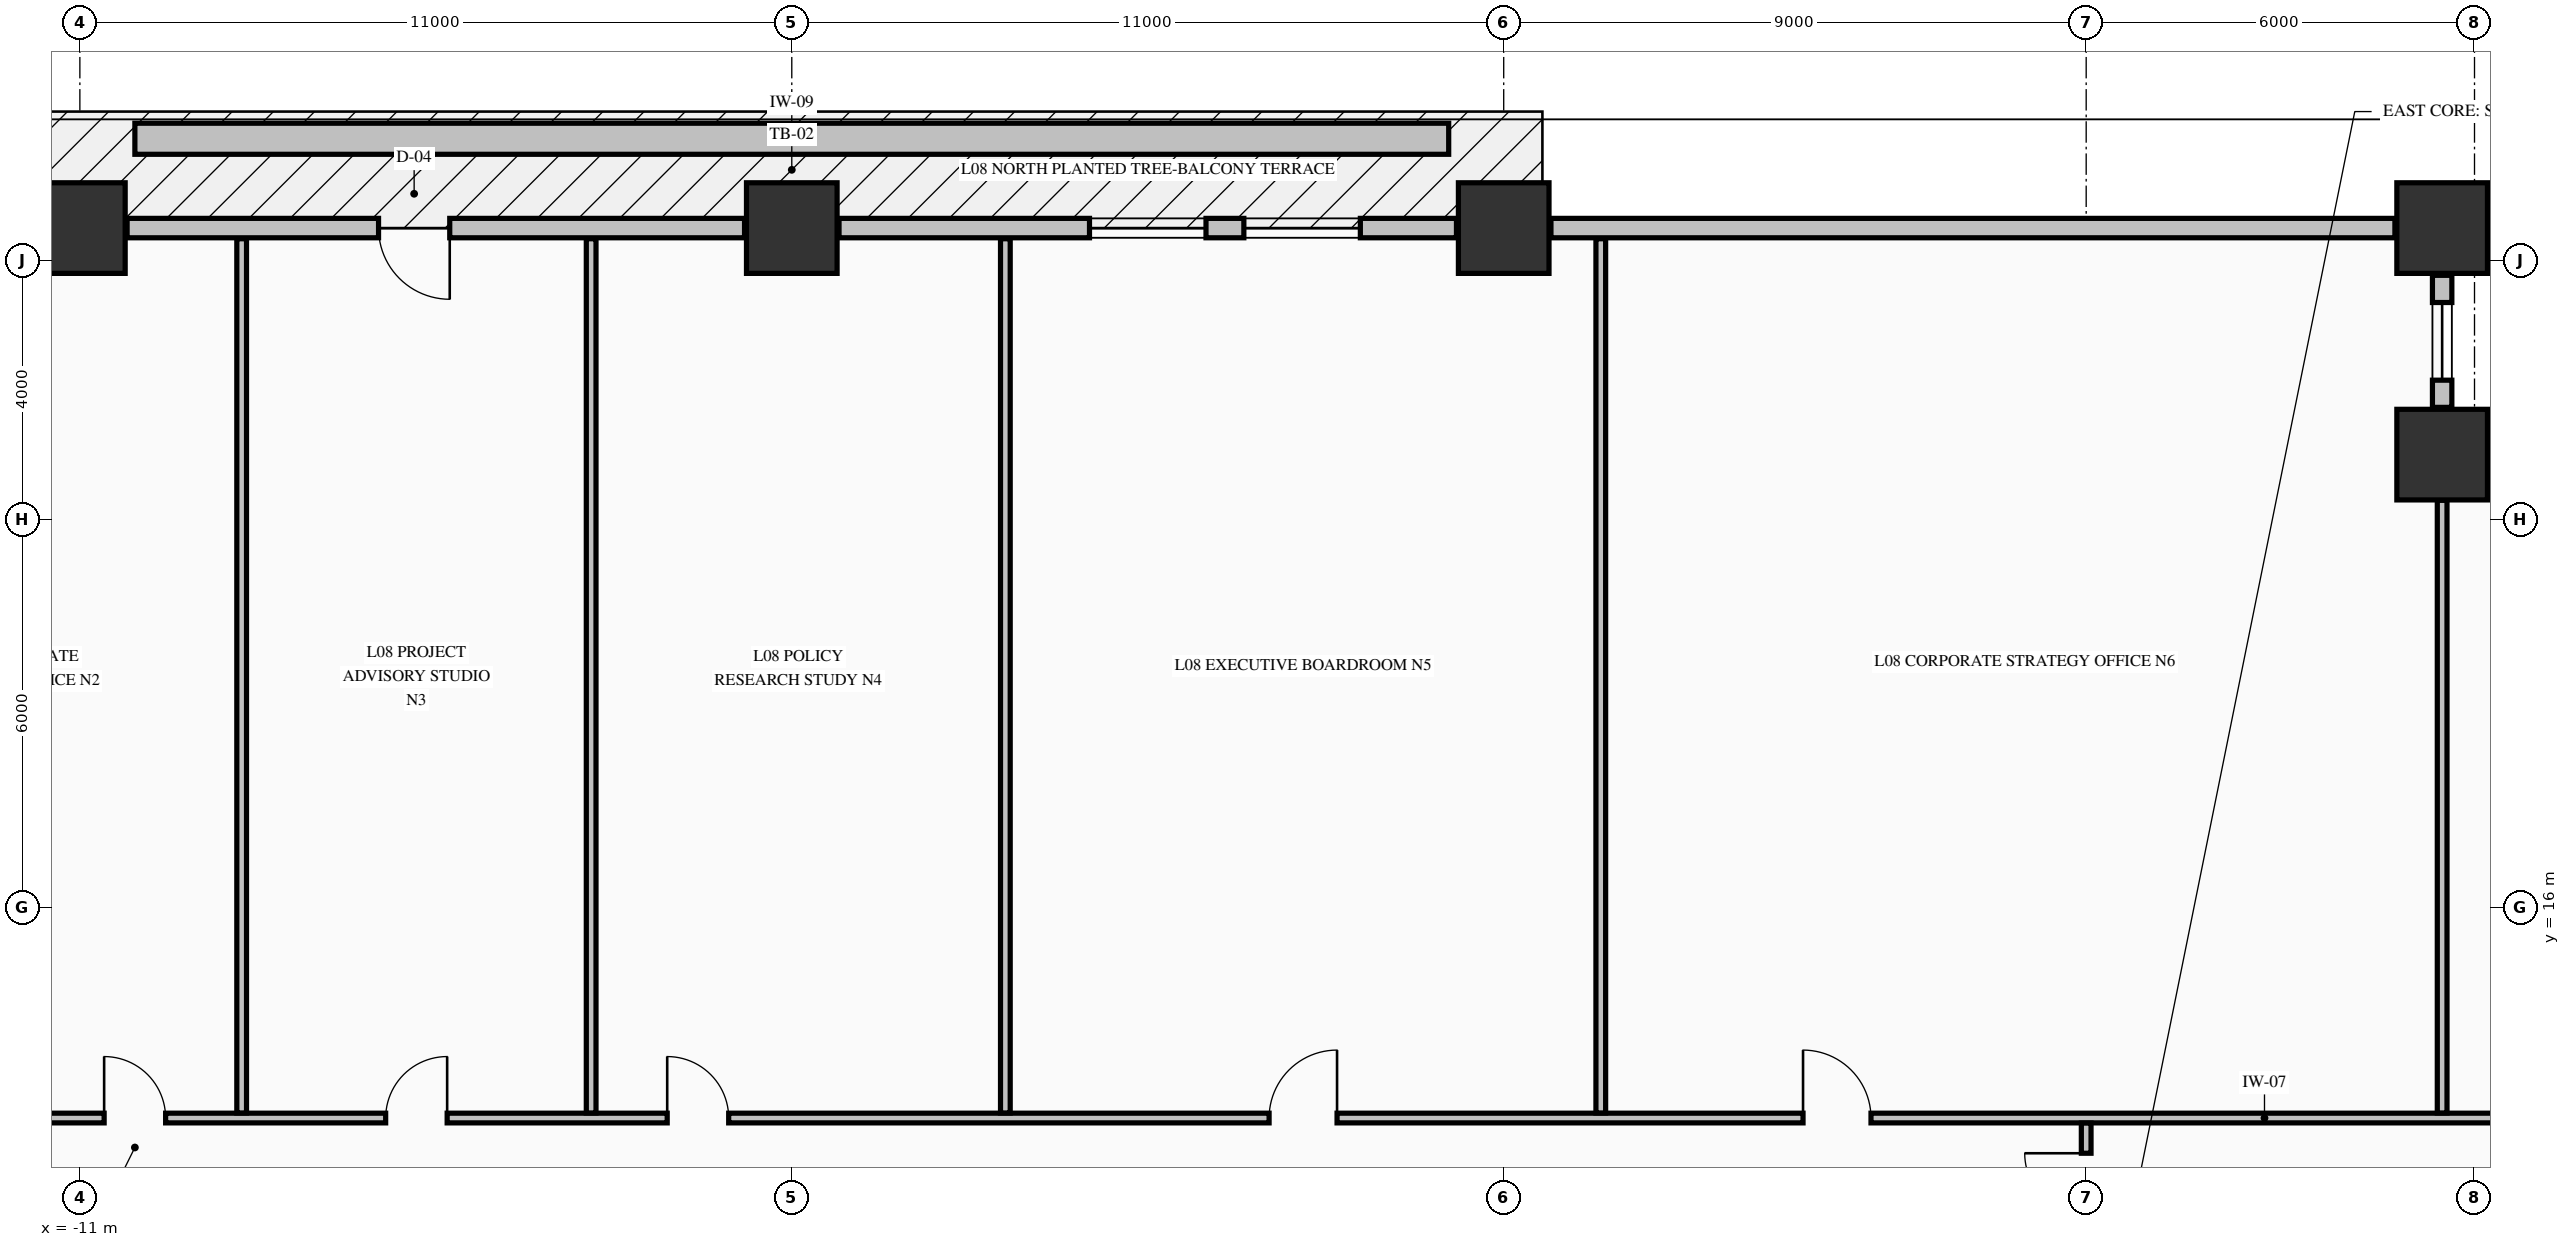
"""IFC4 building model, lengths in metres.
Left out: names, types, materials, properties, quantities, classifications, styles, units other than length and angle.
Written with IfcOpenShell. Run it as: python <this file> out.ifc"""

import sys

from ifc_helpers import new_model, si_unit, direction, frame, frame_2d, origin, origin_2d, place, context, subcontext, project, spatial, rectangle, extrude, element, fill, save


model = new_model("IFC4")
c1 = context("Model", 3, precision=1e-05, world=origin(), true_north=direction((0.0, 1.0)))
c2 = subcontext(c1, "Body", "Model", "MODEL_VIEW")
j1 = project(units=[si_unit("LENGTHUNIT", "METRE"), si_unit("PLANEANGLEUNIT", "RADIAN")], contexts=[c1])
p1 = place(None, origin())
s1 = spatial("IfcSite", under=j1, at=p1, CompositionType="ELEMENT")
p2 = place(p1, origin())
s2 = spatial("IfcBuilding", under=s1, at=p2, CompositionType="ELEMENT")
p3 = place(p2, frame((0.0, 0.0, 37.91)))
s3 = spatial("IfcBuildingStorey", under=s2, at=p3, CompositionType="ELEMENT", Elevation=37.91)
for number, where, z_axis, x_axis in (
    (1, (-11.0, 26.5, -0.25), (0.0, 0.0, 1.0), (1.0, 0.0, 0.0)),
    (2, (0.0, 26.5, -0.25), (0.0, 0.0, 1.0), (1.0, 0.0, 0.0)),
    (3, (11.0, 26.5, -0.25), (0.0, 0.0, 1.0), (1.0, 0.0, 0.0)),
    (4, (25.5, 26.5, -0.25), (0.0, 0.0, 1.0), (1.0, 0.0, 0.0)),
    (5, (25.5, 23.0, -0.25), (0.0, 0.0, 1.0), (1.0, 0.0, 0.0)),
):
    element("IfcColumn", number, at=place(p3, frame(where, z_axis=z_axis, x_axis=x_axis)), inside=s3, PredefinedType="COLUMN", context=c2, shape_type="SweptSolid", body=[
        extrude(rectangle(XDim=1.4, YDim=1.4, at=origin_2d()), origin(), (0.0, 0.0, 1.0), 3.57),
    ])
p4 = place(p3, frame((28.27, 23.0, 0.0), z_axis=(0.0, 0.0, 1.0), x_axis=(-1.0, 0.0, 0.0)))
e6 = element("IfcWall", 6, at=p4, inside=s3, PredefinedType="STANDARD", context=c2, shape_type="SweptSolid", body=[
    extrude(rectangle(XDim=2.04, YDim=0.3, at=frame_2d((1.02, 0.0))), origin(), (0.0, 0.0, 1.0), 2.712),
])
p5 = place(p4, frame((0.42, 0.0, 0.82)))
e7 = element("IfcOpeningElement", 7, at=p5, cuts=e6, PredefinedType="OPENING", context=c2, shape_type="SweptSolid", body=[
    extrude(rectangle(XDim=1.2, YDim=1.65, at=frame_2d((0.6, 0.825))), frame((0.0, 0.16, 0.0), z_axis=(0.0, -1.0, 0.0), x_axis=(1.0, 0.0, 0.0)), (0.0, 0.0, 1.0), 0.32),
])
p6 = place(p3, frame((25.5, 23.73, 0.0), z_axis=(0.0, 0.0, 1.0), x_axis=(0.0, 1.0, 0.0)))
e8 = element("IfcWall", 8, at=p6, inside=s3, PredefinedType="STANDARD", context=c2, shape_type="SweptSolid", body=[
    extrude(rectangle(XDim=2.04, YDim=0.3, at=frame_2d((1.02, 0.0))), origin(), (0.0, 0.0, 1.0), 2.712),
])
p7 = place(p6, frame((0.42, 0.0, 0.82)))
e9 = element("IfcOpeningElement", 9, at=p7, cuts=e8, PredefinedType="OPENING", context=c2, shape_type="SweptSolid", body=[
    extrude(rectangle(XDim=1.2, YDim=1.65, at=frame_2d((0.6, 0.825))), frame((0.0, 0.16, 0.0), z_axis=(0.0, -1.0, 0.0), x_axis=(1.0, 0.0, 0.0)), (0.0, 0.0, 1.0), 0.32),
])
p8 = place(p3, frame((-0.73, 26.5, 0.0), z_axis=(0.0, 0.0, 1.0), x_axis=(-1.0, 0.0, 0.0)))
e10 = element("IfcWall", 10, at=p8, inside=s3, PredefinedType="STANDARD", context=c2, shape_type="SweptSolid", body=[
    extrude(rectangle(XDim=9.54, YDim=0.3, at=frame_2d((4.77, 0.0))), origin(), (0.0, 0.0, 1.0), 2.712),
])
p9 = place(p8, frame((4.555, 0.0, 0.0)))
e11 = element("IfcOpeningElement", 11, at=p9, cuts=e10, PredefinedType="OPENING", context=c2, shape_type="SweptSolid", body=[
    extrude(rectangle(XDim=1.1, YDim=2.15, at=frame_2d((0.55, 1.075))), frame((0.0, 0.16, 0.0), z_axis=(0.0, -1.0, 0.0), x_axis=(1.0, 0.0, 0.0)), (0.0, 0.0, 1.0), 0.32),
])
p10 = place(p3, frame((10.27, 26.5, 0.0), z_axis=(0.0, 0.0, 1.0), x_axis=(-1.0, 0.0, 0.0)))
e12 = element("IfcWall", 12, at=p10, inside=s3, PredefinedType="STANDARD", context=c2, shape_type="SweptSolid", body=[
    extrude(rectangle(XDim=9.54, YDim=0.3, at=frame_2d((4.77, 0.0))), origin(), (0.0, 0.0, 1.0), 2.712),
])
p11 = place(p10, frame((1.485, 0.0, 0.78)))
e13 = element("IfcOpeningElement", 13, at=p11, cuts=e12, PredefinedType="OPENING", context=c2, shape_type="SweptSolid", body=[
    extrude(rectangle(XDim=1.8, YDim=1.72, at=frame_2d((0.9, 0.86))), frame((0.0, 0.16, 0.0), z_axis=(0.0, -1.0, 0.0), x_axis=(1.0, 0.0, 0.0)), (0.0, 0.0, 1.0), 0.32),
])
p12 = place(p10, frame((3.87, 0.0, 0.78)))
e14 = element("IfcOpeningElement", 14, at=p12, cuts=e12, PredefinedType="OPENING", context=c2, shape_type="SweptSolid", body=[
    extrude(rectangle(XDim=1.8, YDim=1.72, at=frame_2d((0.9, 0.86))), frame((0.0, 0.16, 0.0), z_axis=(0.0, -1.0, 0.0), x_axis=(1.0, 0.0, 0.0)), (0.0, 0.0, 1.0), 0.32),
])
p13 = place(p3, frame((24.77, 26.5, 0.0), z_axis=(0.0, 0.0, 1.0), x_axis=(-1.0, 0.0, 0.0)))
e15 = element("IfcWall", 15, at=p13, inside=s3, PredefinedType="STANDARD", context=c2, shape_type="SweptSolid", body=[
    extrude(rectangle(XDim=13.04, YDim=0.3, at=frame_2d((6.52, 0.0))), origin(), (0.0, 0.0, 1.0), 2.712),
])
p14 = place(p3, frame((-23.835, 12.75, 0.0), z_axis=(0.0, 0.0, 1.0), x_axis=(1.0, 0.0, 0.0)))
e16 = element("IfcWall", 16, at=p14, inside=s3, PredefinedType="PARTITIONING", context=c2, shape_type="SweptSolid", body=[
    extrude(rectangle(XDim=52.67, YDim=0.15, at=frame_2d((26.335, 0.0))), origin(), (0.0, 0.0, 1.0), 3.32),
])
p15 = place(p14, frame((5.71, 0.0, 0.0)))
e17 = element("IfcOpeningElement", 17, at=p15, cuts=e16, PredefinedType="OPENING", context=c2, shape_type="SweptSolid", body=[
    extrude(rectangle(XDim=0.95, YDim=2.15, at=frame_2d((0.475, 1.075))), frame((0.0, 0.085, 0.0), z_axis=(0.0, -1.0, 0.0), x_axis=(1.0, 0.0, 0.0)), (0.0, 0.0, 1.0), 0.17),
])
p16 = place(p14, frame((13.21, 0.0, 0.0)))
e18 = element("IfcOpeningElement", 18, at=p16, cuts=e16, PredefinedType="OPENING", context=c2, shape_type="SweptSolid", body=[
    extrude(rectangle(XDim=0.95, YDim=2.15, at=frame_2d((0.475, 1.075))), frame((0.0, 0.085, 0.0), z_axis=(0.0, -1.0, 0.0), x_axis=(1.0, 0.0, 0.0)), (0.0, 0.0, 1.0), 0.17),
])
p17 = place(p14, frame((17.56, 0.0, 0.0)))
e19 = element("IfcOpeningElement", 19, at=p17, cuts=e16, PredefinedType="OPENING", context=c2, shape_type="SweptSolid", body=[
    extrude(rectangle(XDim=0.95, YDim=2.15, at=frame_2d((0.475, 1.075))), frame((0.0, 0.085, 0.0), z_axis=(0.0, -1.0, 0.0), x_axis=(1.0, 0.0, 0.0)), (0.0, 0.0, 1.0), 0.17),
])
p18 = place(p14, frame((21.91, 0.0, 0.0)))
e20 = element("IfcOpeningElement", 20, at=p18, cuts=e16, PredefinedType="OPENING", context=c2, shape_type="SweptSolid", body=[
    extrude(rectangle(XDim=0.95, YDim=2.15, at=frame_2d((0.475, 1.075))), frame((0.0, 0.085, 0.0), z_axis=(0.0, -1.0, 0.0), x_axis=(1.0, 0.0, 0.0)), (0.0, 0.0, 1.0), 0.17),
])
p19 = place(p14, frame((31.21, 0.0, 0.0)))
e21 = element("IfcOpeningElement", 21, at=p19, cuts=e16, PredefinedType="OPENING", context=c2, shape_type="SweptSolid", body=[
    extrude(rectangle(XDim=1.05, YDim=2.15, at=frame_2d((0.525, 1.075))), frame((0.0, 0.085, 0.0), z_axis=(0.0, -1.0, 0.0), x_axis=(1.0, 0.0, 0.0)), (0.0, 0.0, 1.0), 0.17),
])
p20 = place(p14, frame((39.46, 0.0, 0.0)))
e22 = element("IfcOpeningElement", 22, at=p20, cuts=e16, PredefinedType="OPENING", context=c2, shape_type="SweptSolid", body=[
    extrude(rectangle(XDim=1.05, YDim=2.15, at=frame_2d((0.525, 1.075))), frame((0.0, 0.085, 0.0), z_axis=(0.0, -1.0, 0.0), x_axis=(1.0, 0.0, 0.0)), (0.0, 0.0, 1.0), 0.17),
])
for number, where, z_axis, x_axis in (
    (23, (-8.5, 12.828, 0.0), (0.0, 0.0, 1.0), (0.0, 1.0, 0.0)),
    (24, (-3.1, 12.828, 0.0), (0.0, 0.0, 1.0), (0.0, 1.0, 0.0)),
    (25, (3.3, 12.828, 0.0), (0.0, 0.0, 1.0), (0.0, 1.0, 0.0)),
    (26, (12.5, 12.828, 0.0), (0.0, 0.0, 1.0), (0.0, 1.0, 0.0)),
):
    element("IfcWall", number, at=place(p3, frame(where, z_axis=z_axis, x_axis=x_axis)), inside=s3, PredefinedType="PARTITIONING", context=c2, shape_type="SweptSolid", body=[
        extrude(rectangle(XDim=13.507, YDim=0.15, at=frame_2d((6.753, 0.0))), origin(), (0.0, 0.0, 1.0), 3.32),
    ])
p21 = place(p3, frame((20.0, 11.106, 0.0), z_axis=(0.0, 0.0, 1.0), x_axis=(0.0, 1.0, 0.0)))
e27 = element("IfcWall", 27, at=p21, inside=s3, PredefinedType="PARTITIONING", context=c2, shape_type="SweptSolid", body=[
    extrude(rectangle(XDim=1.566, YDim=0.15, at=frame_2d((0.783, 0.0))), origin(), (0.0, 0.0, 1.0), 2.66),
])
p22 = place(p21, frame((0.15, 0.0, 0.0)))
e28 = element("IfcOpeningElement", 28, at=p22, cuts=e27, PredefinedType="OPENING", context=c2, shape_type="SweptSolid", body=[
    extrude(rectangle(XDim=0.95, YDim=2.15, at=frame_2d((0.475, 1.075))), frame((0.0, 0.085, 0.0), z_axis=(0.0, -1.0, 0.0), x_axis=(1.0, 0.0, 0.0)), (0.0, 0.0, 1.0), 0.17),
])
p23 = place(p3, frame((25.5, 12.828, 0.0), z_axis=(0.0, 0.0, 1.0), x_axis=(0.0, 1.0, 0.0)))
e29 = element("IfcWall", 29, at=p23, inside=s3, PredefinedType="PARTITIONING", context=c2, shape_type="SweptSolid", body=[
    extrude(rectangle(XDim=9.466, YDim=0.15, at=frame_2d((4.733, 0.0))), origin(), (0.0, 0.0, 1.0), 3.32),
])
p24 = place(p3, frame((-10.15, 27.88, -0.04), z_axis=(0.0, 0.0, 1.0), x_axis=(1.0, 0.0, 0.0)))
e30 = element("IfcWall", 30, at=p24, inside=s3, PredefinedType="PARAPET", context=c2, shape_type="SweptSolid", body=[
    extrude(rectangle(XDim=20.3, YDim=0.48, at=frame_2d((10.15, 0.0))), origin(), (0.0, 0.0, 1.0), 0.52),
])
p25 = place(p7, origin())
e31 = element("IfcWindow", 31, at=p25, inside=s3, PartitioningType="SINGLE_PANEL", PredefinedType="WINDOW", context=c2, shape_type="SweptSolid", body=[
    extrude(rectangle(XDim=1.2, YDim=1.65, at=frame_2d((0.6, 0.825))), frame((0.0, 0.03, 0.0), z_axis=(0.0, -1.0, 0.0), x_axis=(1.0, 0.0, 0.0)), (0.0, 0.0, 1.0), 0.06),
])
fill(e9, e31)
p26 = place(p9, origin())
e32 = element("IfcDoor", 32, at=p26, inside=s3, OperationType="SINGLE_SWING_LEFT", PredefinedType="DOOR", context=c2, shape_type="SweptSolid", body=[
    extrude(rectangle(XDim=1.1, YDim=2.15, at=frame_2d((0.55, 1.075))), frame((0.0, 0.025, 0.0), z_axis=(0.0, -1.0, 0.0), x_axis=(1.0, 0.0, 0.0)), (0.0, 0.0, 1.0), 0.05),
])
fill(e11, e32)
p27 = place(p11, origin())
e33 = element("IfcWindow", 33, at=p27, inside=s3, PartitioningType="SINGLE_PANEL", PredefinedType="WINDOW", context=c2, shape_type="SweptSolid", body=[
    extrude(rectangle(XDim=1.8, YDim=1.72, at=frame_2d((0.9, 0.86))), frame((0.0, 0.03, 0.0), z_axis=(0.0, -1.0, 0.0), x_axis=(1.0, 0.0, 0.0)), (0.0, 0.0, 1.0), 0.06),
])
fill(e13, e33)
p28 = place(p12, origin())
e34 = element("IfcWindow", 34, at=p28, inside=s3, PartitioningType="SINGLE_PANEL", PredefinedType="WINDOW", context=c2, shape_type="SweptSolid", body=[
    extrude(rectangle(XDim=1.8, YDim=1.72, at=frame_2d((0.9, 0.86))), frame((0.0, 0.03, 0.0), z_axis=(0.0, -1.0, 0.0), x_axis=(1.0, 0.0, 0.0)), (0.0, 0.0, 1.0), 0.06),
])
fill(e14, e34)
p29 = place(p16, origin())
e35 = element("IfcDoor", 35, at=p29, inside=s3, OperationType="SINGLE_SWING_LEFT", PredefinedType="DOOR", context=c2, shape_type="SweptSolid", body=[
    extrude(rectangle(XDim=0.95, YDim=2.15, at=frame_2d((0.475, 1.075))), frame((0.0, 0.025, 0.0), z_axis=(0.0, -1.0, 0.0), x_axis=(1.0, 0.0, 0.0)), (0.0, 0.0, 1.0), 0.05),
])
fill(e18, e35)
p30 = place(p17, origin())
e36 = element("IfcDoor", 36, at=p30, inside=s3, OperationType="SINGLE_SWING_RIGHT", PredefinedType="DOOR", context=c2, shape_type="SweptSolid", body=[
    extrude(rectangle(XDim=0.95, YDim=2.15, at=frame_2d((0.475, 1.075))), frame((0.0, 0.025, 0.0), z_axis=(0.0, -1.0, 0.0), x_axis=(1.0, 0.0, 0.0)), (0.0, 0.0, 1.0), 0.05),
])
fill(e19, e36)
p31 = place(p18, origin())
e37 = element("IfcDoor", 37, at=p31, inside=s3, OperationType="SINGLE_SWING_LEFT", PredefinedType="DOOR", context=c2, shape_type="SweptSolid", body=[
    extrude(rectangle(XDim=0.95, YDim=2.15, at=frame_2d((0.475, 1.075))), frame((0.0, 0.025, 0.0), z_axis=(0.0, -1.0, 0.0), x_axis=(1.0, 0.0, 0.0)), (0.0, 0.0, 1.0), 0.05),
])
fill(e20, e37)
p32 = place(p19, origin())
e38 = element("IfcDoor", 38, at=p32, inside=s3, OperationType="SINGLE_SWING_RIGHT", PredefinedType="DOOR", context=c2, shape_type="SweptSolid", body=[
    extrude(rectangle(XDim=1.05, YDim=2.15, at=frame_2d((0.525, 1.075))), frame((0.0, 0.025, 0.0), z_axis=(0.0, -1.0, 0.0), x_axis=(1.0, 0.0, 0.0)), (0.0, 0.0, 1.0), 0.05),
])
fill(e21, e38)
p33 = place(p20, origin())
e39 = element("IfcDoor", 39, at=p33, inside=s3, OperationType="SINGLE_SWING_LEFT", PredefinedType="DOOR", context=c2, shape_type="SweptSolid", body=[
    extrude(rectangle(XDim=1.05, YDim=2.15, at=frame_2d((0.525, 1.075))), frame((0.0, 0.025, 0.0), z_axis=(0.0, -1.0, 0.0), x_axis=(1.0, 0.0, 0.0)), (0.0, 0.0, 1.0), 0.05),
])
fill(e22, e39)
p34 = place(p22, origin())
e40 = element("IfcDoor", 40, at=p34, inside=s3, OperationType="SINGLE_SWING_RIGHT", PredefinedType="DOOR", context=c2, shape_type="SweptSolid", body=[
    extrude(rectangle(XDim=0.95, YDim=2.15, at=frame_2d((0.475, 1.075))), frame((0.0, 0.025, 0.0), z_axis=(0.0, -1.0, 0.0), x_axis=(1.0, 0.0, 0.0)), (0.0, 0.0, 1.0), 0.05),
])
fill(e28, e40)
save(model, sys.argv[1])
